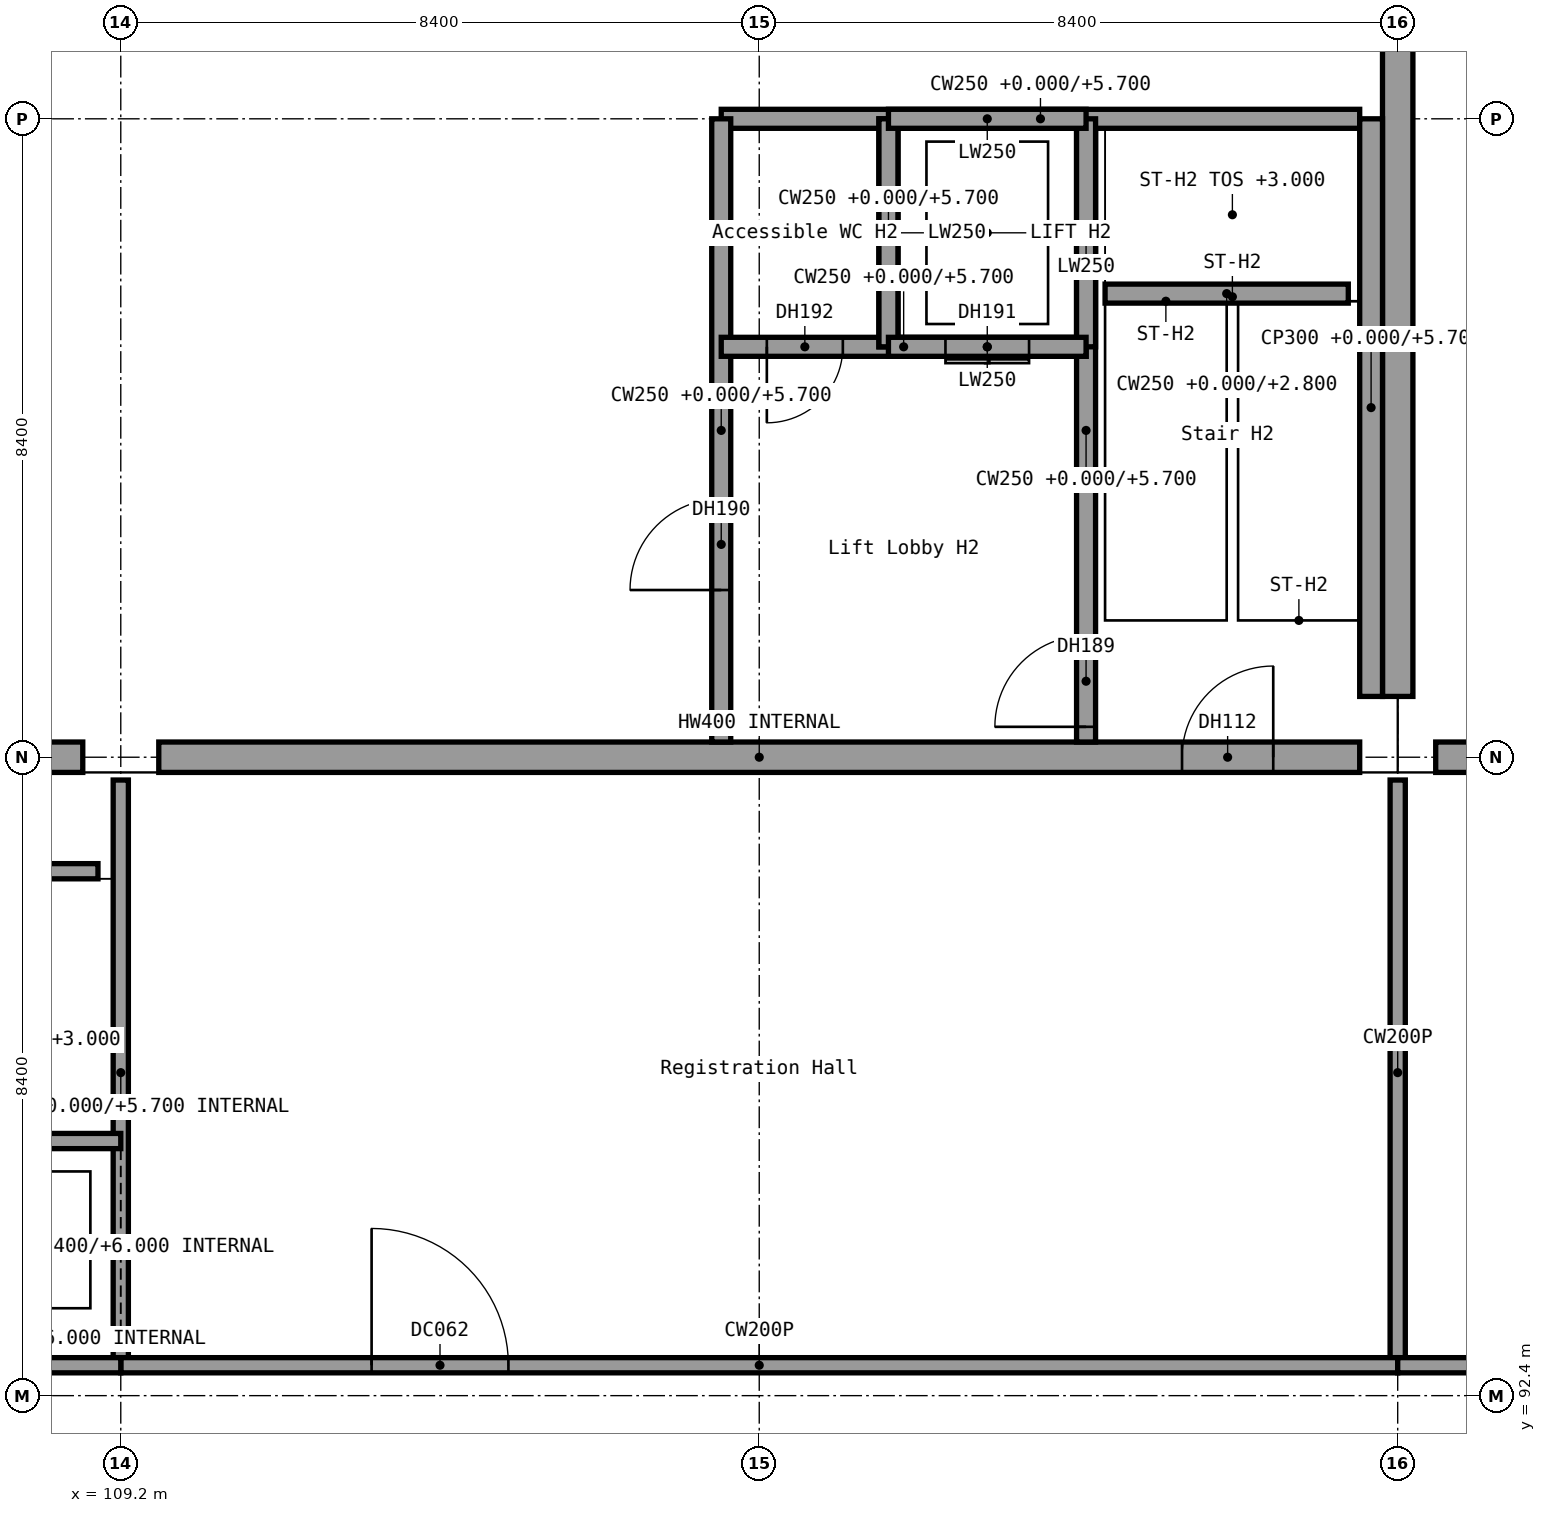
"""IFC4 building model, lengths in metres.
Left out: names, types, materials, properties, quantities, classifications, styles, units other than length and angle.
Written with IfcOpenShell. Run it as: python <this file> out.ifc"""

import sys

from ifc_helpers import new_model, si_unit, direction, frame, frame_2d, origin, origin_2d, place, context, subcontext, project, spatial, rectangle, extrude, element, fill, save


model = new_model("IFC4")
c1 = context("Model", 3, precision=1e-05, world=origin(), true_north=direction((0.0, 1.0)))
c2 = subcontext(c1, "Body", "Model", "MODEL_VIEW")
j1 = project(units=[si_unit("LENGTHUNIT", "METRE"), si_unit("PLANEANGLEUNIT", "RADIAN")], contexts=[c1])
p1 = place(None, origin())
s1 = spatial("IfcSite", under=j1, at=p1, CompositionType="ELEMENT")
p2 = place(p1, origin())
s2 = spatial("IfcBuilding", under=s1, at=p2, CompositionType="ELEMENT")
p3 = place(p2, origin())
s3 = spatial("IfcBuildingStorey", under=s2, at=p3, CompositionType="ELEMENT", Elevation=0.0)
for number, where, z_axis, x_axis in (
    (1, (109.2, 100.8, 0.0), (0.0, 0.0, 1.0), (1.0, 0.0, 0.0)),
    (2, (126.0, 100.8, 0.0), (0.0, 0.0, 1.0), (1.0, 0.0, 0.0)),
):
    element("IfcColumn", number, at=place(p3, frame(where, z_axis=z_axis, x_axis=x_axis)), inside=s3, PredefinedType="COLUMN", context=c2, shape_type="SweptSolid", body=[
        extrude(rectangle(XDim=1.0, YDim=1.6, at=origin_2d()), origin(), (0.0, 0.0, 1.0), 6.0),
    ])
p4 = place(p3, frame((92.9, 100.8, 0.0), z_axis=(0.0, 0.0, 1.0), x_axis=(1.0, 0.0, 0.0)))
e3 = element("IfcWall", 3, at=p4, inside=s3, PredefinedType="STANDARD", context=c2, shape_type="SweptSolid", body=[
    extrude(rectangle(XDim=15.8, YDim=0.4, at=frame_2d((7.9, 0.0))), origin(), (0.0, 0.0, 1.0), 4.5),
])
p5 = place(p4, frame((2.5, 0.0, 0.0)))
e4 = element("IfcOpeningElement", 4, at=p5, cuts=e3, PredefinedType="OPENING", context=c2, shape_type="SweptSolid", body=[
    extrude(rectangle(XDim=2.4, YDim=2.4, at=frame_2d((1.2, 1.2))), frame((0.0, 0.2, 0.0), z_axis=(0.0, -1.0, 0.0), x_axis=(1.0, 0.0, 0.0)), (0.0, 0.0, 1.0), 0.4),
])
p6 = place(p4, frame((10.9, 0.0, 0.0)))
e5 = element("IfcOpeningElement", 5, at=p6, cuts=e3, PredefinedType="OPENING", context=c2, shape_type="SweptSolid", body=[
    extrude(rectangle(XDim=2.4, YDim=2.4, at=frame_2d((1.2, 1.2))), frame((0.0, 0.2, 0.0), z_axis=(0.0, -1.0, 0.0), x_axis=(1.0, 0.0, 0.0)), (0.0, 0.0, 1.0), 0.4),
])
p7 = place(p3, frame((109.7, 100.8, 0.0), z_axis=(0.0, 0.0, 1.0), x_axis=(1.0, 0.0, 0.0)))
e6 = element("IfcWall", 6, at=p7, inside=s3, PredefinedType="STANDARD", context=c2, shape_type="SweptSolid", body=[
    extrude(rectangle(XDim=15.8, YDim=0.4, at=frame_2d((7.9, 0.0))), origin(), (0.0, 0.0, 1.0), 4.5),
])
p8 = place(p7, frame((13.462, 0.0, 0.0)))
e7 = element("IfcOpeningElement", 7, at=p8, cuts=e6, PredefinedType="OPENING", context=c2, shape_type="SweptSolid", body=[
    extrude(rectangle(XDim=1.2, YDim=2.1, at=frame_2d((0.6, 1.05))), frame((0.0, 0.2, 0.0), z_axis=(0.0, -1.0, 0.0), x_axis=(1.0, 0.0, 0.0)), (0.0, 0.0, 1.0), 0.4),
])
p9 = place(p3, frame((126.0, 101.6, 0.0), z_axis=(0.0, 0.0, 1.0), x_axis=(0.0, 1.0, 0.0)))
e8 = element("IfcWall", 8, at=p9, inside=s3, PredefinedType="SHEAR", context=c2, shape_type="SweptSolid", body=[
    extrude(rectangle(XDim=99.2, YDim=0.4, at=frame_2d((49.6, 0.0))), origin(), (0.0, 0.0, 1.0), 6.0),
])
p10 = place(p9, frame((19.2, 0.0, 0.0)))
e9 = element("IfcOpeningElement", 9, at=p10, cuts=e8, PredefinedType="OPENING", context=c2, shape_type="SweptSolid", body=[
    extrude(rectangle(XDim=2.4, YDim=2.4, at=frame_2d((1.2, 1.2))), frame((0.0, 0.2, 0.0), z_axis=(0.0, -1.0, 0.0), x_axis=(1.0, 0.0, 0.0)), (0.0, 0.0, 1.0), 0.4),
])
p11 = place(p9, frame((39.2, 0.0, 0.0)))
e10 = element("IfcOpeningElement", 10, at=p11, cuts=e8, PredefinedType="OPENING", context=c2, shape_type="SweptSolid", body=[
    extrude(rectangle(XDim=2.4, YDim=2.4, at=frame_2d((1.2, 1.2))), frame((0.0, 0.2, 0.0), z_axis=(0.0, -1.0, 0.0), x_axis=(1.0, 0.0, 0.0)), (0.0, 0.0, 1.0), 0.4),
])
p12 = place(p9, frame((57.2, 0.0, 0.0)))
e11 = element("IfcOpeningElement", 11, at=p12, cuts=e8, PredefinedType="OPENING", context=c2, shape_type="SweptSolid", body=[
    extrude(rectangle(XDim=2.4, YDim=2.4, at=frame_2d((1.2, 1.2))), frame((0.0, 0.2, 0.0), z_axis=(0.0, -1.0, 0.0), x_axis=(1.0, 0.0, 0.0)), (0.0, 0.0, 1.0), 0.4),
])
p13 = place(p9, frame((77.2, 0.0, 0.0)))
e12 = element("IfcOpeningElement", 12, at=p13, cuts=e8, PredefinedType="OPENING", context=c2, shape_type="SweptSolid", body=[
    extrude(rectangle(XDim=2.4, YDim=2.4, at=frame_2d((1.2, 1.2))), frame((0.0, 0.2, 0.0), z_axis=(0.0, -1.0, 0.0), x_axis=(1.0, 0.0, 0.0)), (0.0, 0.0, 1.0), 0.4),
])
p14 = place(p3, frame((126.5, 100.8, 0.0), z_axis=(0.0, 0.0, 1.0), x_axis=(1.0, 0.0, 0.0)))
e13 = element("IfcWall", 13, at=p14, inside=s3, PredefinedType="SHEAR", context=c2, shape_type="SweptSolid", body=[
    extrude(rectangle(XDim=15.8, YDim=0.4, at=frame_2d((7.9, 0.0))), origin(), (0.0, 0.0, 1.0), 5.7),
])
p15 = place(p14, frame((2.5, 0.0, 0.0)))
e14 = element("IfcOpeningElement", 14, at=p15, cuts=e13, PredefinedType="OPENING", context=c2, shape_type="SweptSolid", body=[
    extrude(rectangle(XDim=2.4, YDim=2.4, at=frame_2d((1.2, 1.2))), frame((0.0, 0.2, 0.0), z_axis=(0.0, -1.0, 0.0), x_axis=(1.0, 0.0, 0.0)), (0.0, 0.0, 1.0), 0.4),
])
p16 = place(p14, frame((10.9, 0.0, 0.0)))
e15 = element("IfcOpeningElement", 15, at=p16, cuts=e13, PredefinedType="OPENING", context=c2, shape_type="SweptSolid", body=[
    extrude(rectangle(XDim=2.4, YDim=2.4, at=frame_2d((1.2, 1.2))), frame((0.0, 0.2, 0.0), z_axis=(0.0, -1.0, 0.0), x_axis=(1.0, 0.0, 0.0)), (0.0, 0.0, 1.0), 0.4),
])
p17 = place(p3, frame((121.9, 101.0, 0.0), z_axis=(0.0, 0.0, 1.0), x_axis=(0.0, 1.0, 0.0)))
e16 = element("IfcWall", 16, at=p17, inside=s3, PredefinedType="SHEAR", context=c2, shape_type="SweptSolid", body=[
    extrude(rectangle(XDim=8.2, YDim=0.25, at=frame_2d((4.1, 0.0))), origin(), (0.0, 0.0, 1.0), 5.7),
])
p18 = place(p17, frame((0.2, 0.0, 0.0)))
e17 = element("IfcOpeningElement", 17, at=p18, cuts=e16, PredefinedType="OPENING", context=c2, shape_type="SweptSolid", body=[
    extrude(rectangle(XDim=1.2, YDim=2.1, at=frame_2d((0.6, 1.05))), frame((0.0, 0.125, 0.0), z_axis=(0.0, -1.0, 0.0), x_axis=(1.0, 0.0, 0.0)), (0.0, 0.0, 1.0), 0.25),
])
p19 = place(p3, frame((125.5, 109.2, 0.0), z_axis=(0.0, 0.0, 1.0), x_axis=(-1.0, 0.0, 0.0)))
e18 = element("IfcWall", 18, at=p19, inside=s3, PredefinedType="SHEAR", context=c2, shape_type="SweptSolid", body=[
    extrude(rectangle(XDim=8.4, YDim=0.25, at=frame_2d((4.2, 0.0))), origin(), (0.0, 0.0, 1.0), 5.7),
])
p20 = place(p3, frame((117.1, 101.0, 0.0), z_axis=(0.0, 0.0, 1.0), x_axis=(0.0, 1.0, 0.0)))
e19 = element("IfcWall", 19, at=p20, inside=s3, PredefinedType="SHEAR", context=c2, shape_type="SweptSolid", body=[
    extrude(rectangle(XDim=8.2, YDim=0.25, at=frame_2d((4.1, 0.0))), origin(), (0.0, 0.0, 1.0), 5.7),
])
p21 = place(p20, frame((2.0, 0.0, 0.0)))
e20 = element("IfcOpeningElement", 20, at=p21, cuts=e19, PredefinedType="OPENING", context=c2, shape_type="SweptSolid", body=[
    extrude(rectangle(XDim=1.2, YDim=2.1, at=frame_2d((0.6, 1.05))), frame((0.0, 0.125, 0.0), z_axis=(0.0, -1.0, 0.0), x_axis=(1.0, 0.0, 0.0)), (0.0, 0.0, 1.0), 0.25),
])
p22 = place(p3, frame((121.9, 106.2, 0.0), z_axis=(0.0, 0.0, 1.0), x_axis=(-1.0, 0.0, 0.0)))
e21 = element("IfcWall", 21, at=p22, inside=s3, PredefinedType="SHEAR", context=c2, shape_type="SweptSolid", body=[
    extrude(rectangle(XDim=4.8, YDim=0.25, at=frame_2d((2.4, 0.0))), origin(), (0.0, 0.0, 1.0), 5.7),
])
p23 = place(p22, frame((0.75, 0.0, 0.0)))
e22 = element("IfcOpeningElement", 22, at=p23, cuts=e21, PredefinedType="OPENING", context=c2, shape_type="SweptSolid", body=[
    extrude(rectangle(XDim=1.1, YDim=2.1, at=frame_2d((0.55, 1.05))), frame((0.0, 0.125, 0.0), z_axis=(0.0, -1.0, 0.0), x_axis=(1.0, 0.0, 0.0)), (0.0, 0.0, 1.0), 0.25),
])
p24 = place(p22, frame((3.2, 0.0, 0.0)))
e23 = element("IfcOpeningElement", 23, at=p24, cuts=e21, PredefinedType="OPENING", context=c2, shape_type="SweptSolid", body=[
    extrude(rectangle(XDim=1.0, YDim=2.1, at=frame_2d((0.5, 1.05))), frame((0.0, 0.125, 0.0), z_axis=(0.0, -1.0, 0.0), x_axis=(1.0, 0.0, 0.0)), (0.0, 0.0, 1.0), 0.25),
])
p25 = place(p3, frame((119.3, 106.2, 0.0), z_axis=(0.0, 0.0, 1.0), x_axis=(0.0, 1.0, 0.0)))
e24 = element("IfcWall", 24, at=p25, inside=s3, PredefinedType="SHEAR", context=c2, shape_type="SweptSolid", body=[
    extrude(rectangle(XDim=3.0, YDim=0.25, at=frame_2d((1.5, 0.0))), origin(), (0.0, 0.0, 1.0), 5.7),
])
p26 = place(p3, frame((125.65, 101.6, 0.0), z_axis=(0.0, 0.0, 1.0), x_axis=(0.0, 1.0, 0.0)))
e25 = element("IfcWall", 25, at=p26, inside=s3, PredefinedType="SHEAR", context=c2, shape_type="SweptSolid", body=[
    extrude(rectangle(XDim=7.6, YDim=0.3, at=frame_2d((3.8, 0.0))), origin(), (0.0, 0.0, 1.0), 5.7),
])
p27 = place(p3, frame((125.35, 106.9, 0.0), z_axis=(0.0, 0.0, 1.0), x_axis=(-1.0, 0.0, 0.0)))
e26 = element("IfcWall", 26, at=p27, inside=s3, PredefinedType="SHEAR", context=c2, shape_type="SweptSolid", body=[
    extrude(rectangle(XDim=3.2, YDim=0.25, at=frame_2d((1.6, 0.0))), origin(), (0.0, 0.0, 1.0), 2.8),
])
for number, where, z_axis, x_axis in (
    (27, (121.9, 106.2, -1.4), (0.0, 0.0, 1.0), (0.0, 1.0, 0.0)),
    (28, (119.3, 106.2, -1.4), (0.0, 0.0, 1.0), (0.0, 1.0, 0.0)),
):
    element("IfcWall", number, at=place(p3, frame(where, z_axis=z_axis, x_axis=x_axis)), inside=s3, PredefinedType="SHEAR", context=c2, shape_type="SweptSolid", body=[
        extrude(rectangle(XDim=3.0, YDim=0.25, at=frame_2d((1.5, 0.0))), origin(), (0.0, 0.0, 1.0), 1.4),
    ])
for number, where, z_axis, x_axis in (
    (29, (121.9, 106.2, -1.4), (0.0, 0.0, 1.0), (-1.0, 0.0, 0.0)),
    (30, (121.9, 109.2, -1.4), (0.0, 0.0, 1.0), (-1.0, 0.0, 0.0)),
):
    element("IfcWall", number, at=place(p3, frame(where, z_axis=z_axis, x_axis=x_axis)), inside=s3, PredefinedType="SHEAR", context=c2, shape_type="SweptSolid", body=[
        extrude(rectangle(XDim=2.6, YDim=0.25, at=frame_2d((1.3, 0.0))), origin(), (0.0, 0.0, 1.0), 1.4),
    ])
for number, where, z_axis, x_axis in (
    (31, (109.2, 92.4, 0.0), (0.0, 0.0, 1.0), (1.0, 0.0, 0.0)),
    (32, (117.6, 92.4, 0.0), (0.0, 0.0, 1.0), (1.0, 0.0, 0.0)),
    (33, (126.0, 92.4, 0.0), (0.0, 0.0, 1.0), (1.0, 0.0, 0.0)),
    (34, (109.2, 99.6, 0.0), (0.0, 0.0, 1.0), (1.0, 0.0, 0.0)),
    (35, (117.6, 99.6, 0.0), (0.0, 0.0, 1.0), (1.0, 0.0, 0.0)),
    (36, (126.0, 99.6, 0.0), (0.0, 0.0, 1.0), (1.0, 0.0, 0.0)),
):
    element("IfcColumn", number, at=place(p3, frame(where, z_axis=z_axis, x_axis=x_axis)), inside=s3, PredefinedType="COLUMN", context=c2, shape_type="SweptSolid", body=[
        extrude(rectangle(XDim=0.6, YDim=0.6, at=origin_2d()), origin(), (0.0, 0.0, 1.0), 6.0),
    ])
p28 = place(p3, frame((109.2, 100.5, 0.0), z_axis=(0.0, 0.0, 1.0), x_axis=(0.0, -1.0, 0.0)))
e37 = element("IfcWall", 37, at=p28, inside=s3, PredefinedType="SOLIDWALL", context=c2, shape_type="SweptSolid", body=[
    extrude(rectangle(XDim=7.7, YDim=0.2, at=frame_2d((3.85, 0.0))), origin(), (0.0, 0.0, 1.0), 5.7),
])
p29 = place(p3, frame((101.1, 99.3, 0.0), z_axis=(0.0, 0.0, 1.0), x_axis=(1.0, 0.0, 0.0)))
e38 = element("IfcWall", 38, at=p29, inside=s3, PredefinedType="SOLIDWALL", context=c2, shape_type="SweptSolid", body=[
    extrude(rectangle(XDim=7.8, YDim=0.2, at=frame_2d((3.9, 0.0))), origin(), (0.0, 0.0, 1.0), 5.1),
])
p30 = place(p3, frame((126.0, 100.5, 0.0), z_axis=(0.0, 0.0, 1.0), x_axis=(0.0, -1.0, 0.0)))
e39 = element("IfcWall", 39, at=p30, inside=s3, PredefinedType="PARTITIONING", context=c2, shape_type="SweptSolid", body=[
    extrude(rectangle(XDim=7.7, YDim=0.2, at=frame_2d((3.85, 0.0))), origin(), (0.0, 0.0, 1.0), 5.7),
])
p31 = place(p3, frame((109.2, 92.8, 0.0), z_axis=(0.0, 0.0, 1.0), x_axis=(1.0, 0.0, 0.0)))
e40 = element("IfcWall", 40, at=p31, inside=s3, PredefinedType="PARTITIONING", context=c2, shape_type="SweptSolid", body=[
    extrude(rectangle(XDim=16.8, YDim=0.2, at=frame_2d((8.4, 0.0))), origin(), (0.0, 0.0, 1.0), 5.7),
])
p32 = place(p31, frame((3.3, 0.0, 0.0)))
e41 = element("IfcOpeningElement", 41, at=p32, cuts=e40, PredefinedType="OPENING", context=c2, shape_type="SweptSolid", body=[
    extrude(rectangle(XDim=1.8, YDim=2.4, at=frame_2d((0.9, 1.2))), frame((0.0, 0.1, 0.0), z_axis=(0.0, -1.0, 0.0), x_axis=(1.0, 0.0, 0.0)), (0.0, 0.0, 1.0), 0.2),
])
p33 = place(p3, frame((126.0, 92.8, 0.0), z_axis=(0.0, 0.0, 1.0), x_axis=(1.0, 0.0, 0.0)))
e42 = element("IfcWall", 42, at=p33, inside=s3, PredefinedType="PARTITIONING", context=c2, shape_type="SweptSolid", body=[
    extrude(rectangle(XDim=16.8, YDim=0.2, at=frame_2d((8.4, 0.0))), origin(), (0.0, 0.0, 1.0), 5.7),
])
p34 = place(p33, frame((3.3, 0.0, 0.0)))
e43 = element("IfcOpeningElement", 43, at=p34, cuts=e42, PredefinedType="OPENING", context=c2, shape_type="SweptSolid", body=[
    extrude(rectangle(XDim=1.8, YDim=2.4, at=frame_2d((0.9, 1.2))), frame((0.0, 0.1, 0.0), z_axis=(0.0, -1.0, 0.0), x_axis=(1.0, 0.0, 0.0)), (0.0, 0.0, 1.0), 0.2),
])
p35 = place(p3, frame((100.8, 92.8, 0.0), z_axis=(0.0, 0.0, 1.0), x_axis=(1.0, 0.0, 0.0)))
e44 = element("IfcWall", 44, at=p35, inside=s3, PredefinedType="SOLIDWALL", context=c2, shape_type="SweptSolid", body=[
    extrude(rectangle(XDim=8.4, YDim=0.2, at=frame_2d((4.2, 0.0))), origin(), (0.0, 0.0, 1.0), 5.7),
])
p36 = place(p35, frame((1.2, 0.0, 0.0)))
e45 = element("IfcOpeningElement", 45, at=p36, cuts=e44, PredefinedType="OPENING", context=c2, shape_type="SweptSolid", body=[
    extrude(rectangle(XDim=2.4, YDim=2.4, at=frame_2d((1.2, 1.2))), frame((0.0, 0.1, 0.0), z_axis=(0.0, -1.0, 0.0), x_axis=(1.0, 0.0, 0.0)), (0.0, 0.0, 1.0), 0.2),
])
p37 = place(p3, frame((100.8, 95.75, 0.0), z_axis=(0.0, 0.0, 1.0), x_axis=(1.0, 0.0, 0.0)))
e46 = element("IfcWall", 46, at=p37, inside=s3, PredefinedType="SOLIDWALL", context=c2, shape_type="SweptSolid", body=[
    extrude(rectangle(XDim=8.4, YDim=0.2, at=frame_2d((4.2, 0.0))), origin(), (0.0, 0.0, 1.0), 5.7),
])
p38 = place(p37, frame((0.4, 0.0, 0.0)))
e47 = element("IfcOpeningElement", 47, at=p38, cuts=e46, PredefinedType="OPENING", context=c2, shape_type="SweptSolid", body=[
    extrude(rectangle(XDim=1.2, YDim=2.4, at=frame_2d((0.6, 1.2))), frame((0.0, 0.1, 0.0), z_axis=(0.0, -1.0, 0.0), x_axis=(1.0, 0.0, 0.0)), (0.0, 0.0, 1.0), 0.2),
])
p39 = place(p3, frame((106.1, 93.15, -1.4), z_axis=(0.0, 0.0, 1.0), x_axis=(1.0, 0.0, 0.0)))
e48 = element("IfcWall", 48, at=p39, inside=s3, PredefinedType="SOLIDWALL", context=c2, shape_type="SweptSolid", body=[
    extrude(rectangle(XDim=3.1, YDim=0.2, at=frame_2d((1.55, 0.0))), origin(), (0.0, 0.0, 1.0), 7.4),
])
p40 = place(p8, origin())
e49 = element("IfcDoor", 49, at=p40, inside=s3, OperationType="SINGLE_SWING_RIGHT", PredefinedType="DOOR", context=c2, shape_type="SweptSolid", body=[
    extrude(rectangle(XDim=1.2, YDim=2.1, at=frame_2d((0.6, 1.05))), frame((0.0, 0.025, 0.0), z_axis=(0.0, -1.0, 0.0), x_axis=(1.0, 0.0, 0.0)), (0.0, 0.0, 1.0), 0.05),
])
fill(e7, e49)
p41 = place(p18, origin())
e50 = element("IfcDoor", 50, at=p41, inside=s3, OperationType="SINGLE_SWING_LEFT", PredefinedType="DOOR", context=c2, shape_type="SweptSolid", body=[
    extrude(rectangle(XDim=1.2, YDim=2.1, at=frame_2d((0.6, 1.05))), frame((0.0, 0.025, 0.0), z_axis=(0.0, -1.0, 0.0), x_axis=(1.0, 0.0, 0.0)), (0.0, 0.0, 1.0), 0.05),
])
fill(e17, e50)
p42 = place(p21, origin())
e51 = element("IfcDoor", 51, at=p42, inside=s3, OperationType="SINGLE_SWING_LEFT", PredefinedType="DOOR", context=c2, shape_type="SweptSolid", body=[
    extrude(rectangle(XDim=1.2, YDim=2.1, at=frame_2d((0.6, 1.05))), frame((0.0, 0.025, 0.0), z_axis=(0.0, -1.0, 0.0), x_axis=(1.0, 0.0, 0.0)), (0.0, 0.0, 1.0), 0.05),
])
fill(e20, e51)
p43 = place(p23, origin())
e52 = element("IfcDoor", 52, at=p43, inside=s3, OperationType="DOUBLE_DOOR_SLIDING", PredefinedType="DOOR", context=c2, shape_type="SweptSolid", body=[
    extrude(rectangle(XDim=1.1, YDim=2.1, at=frame_2d((0.55, 1.05))), frame((0.0, 0.025, 0.0), z_axis=(0.0, -1.0, 0.0), x_axis=(1.0, 0.0, 0.0)), (0.0, 0.0, 1.0), 0.05),
])
fill(e22, e52)
p44 = place(p24, origin())
e53 = element("IfcDoor", 53, at=p44, inside=s3, OperationType="SINGLE_SWING_RIGHT", PredefinedType="DOOR", context=c2, shape_type="SweptSolid", body=[
    extrude(rectangle(XDim=1.0, YDim=2.1, at=frame_2d((0.5, 1.05))), frame((0.0, 0.025, 0.0), z_axis=(0.0, -1.0, 0.0), x_axis=(1.0, 0.0, 0.0)), (0.0, 0.0, 1.0), 0.05),
])
fill(e23, e53)
p45 = place(p32, origin())
e54 = element("IfcDoor", 54, at=p45, inside=s3, OperationType="DOUBLE_DOOR_DOUBLE_SWING", PredefinedType="DOOR", context=c2, shape_type="SweptSolid", body=[
    extrude(rectangle(XDim=1.8, YDim=2.4, at=frame_2d((0.9, 1.2))), frame((0.0, 0.025, 0.0), z_axis=(0.0, -1.0, 0.0), x_axis=(1.0, 0.0, 0.0)), (0.0, 0.0, 1.0), 0.05),
])
fill(e41, e54)
save(model, sys.argv[1])
